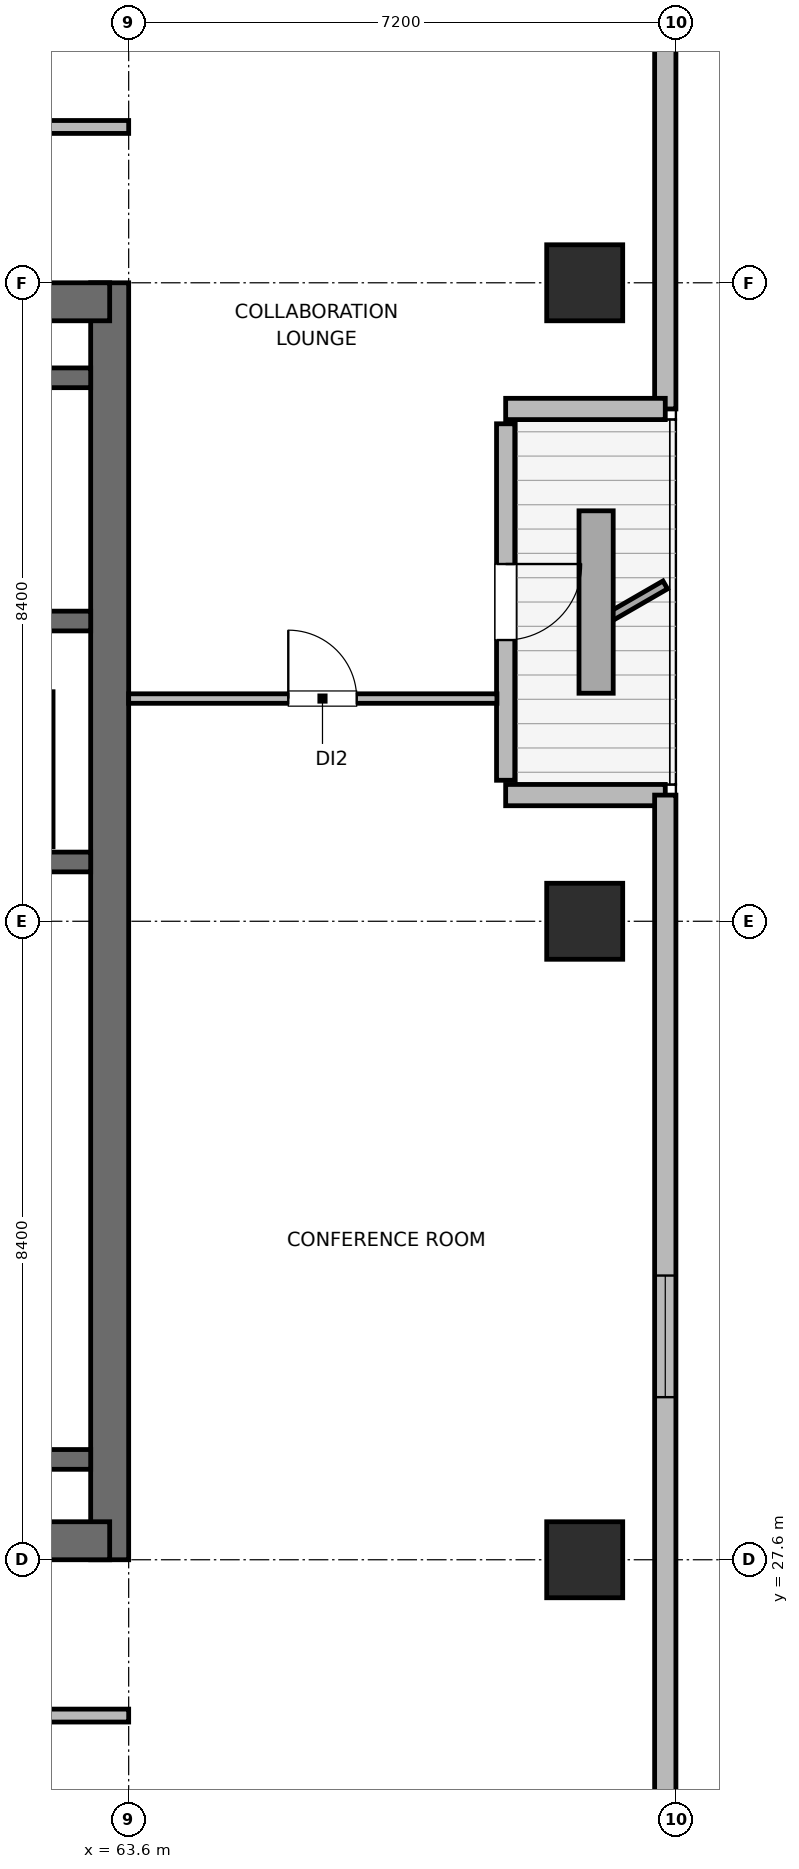
"""IFC4 building model, lengths in metres.
Left out: names, types, materials, properties, quantities, classifications, styles, units other than length and angle.
Written with IfcOpenShell. Run it as: python <this file> out.ifc"""

import sys

from ifc_helpers import new_model, si_unit, direction, frame, frame_2d, origin, origin_2d, place, context, subcontext, project, spatial, rectangle, extrude, element, fill, save


model = new_model("IFC4")
c1 = context("Model", 3, precision=1e-05, world=origin(), true_north=direction((0.0, 1.0)))
c2 = subcontext(c1, "Body", "Model", "MODEL_VIEW")
j1 = project(units=[si_unit("LENGTHUNIT", "METRE"), si_unit("PLANEANGLEUNIT", "RADIAN")], contexts=[c1])
p1 = place(None, origin())
s1 = spatial("IfcSite", under=j1, at=p1, CompositionType="ELEMENT")
p2 = place(p1, origin())
s2 = spatial("IfcBuilding", under=s1, at=p2, CompositionType="ELEMENT")
p3 = place(p2, frame((0.0, 0.0, 278.4)))
s3 = spatial("IfcBuildingStorey", under=s2, at=p3, CompositionType="ELEMENT", Elevation=278.4)
p4 = place(p3, frame((63.35, 27.6, 0.0), z_axis=(0.0, 0.0, 1.0), x_axis=(0.0, 1.0, 0.0)))
e1 = element("IfcWall", 1, at=p4, inside=s3, PredefinedType="SHEAR", context=c2, shape_type="SweptSolid", body=[
    extrude(rectangle(XDim=16.8, YDim=0.5, at=frame_2d((8.4, 0.0))), origin(), (0.0, 0.0, 1.0), 3.9),
])
p5 = place(p3, frame((53.85, 27.85, 0.0), z_axis=(0.0, 0.0, 1.0), x_axis=(1.0, 0.0, 0.0)))
e2 = element("IfcWall", 2, at=p5, inside=s3, PredefinedType="SHEAR", context=c2, shape_type="SweptSolid", body=[
    extrude(rectangle(XDim=9.5, YDim=0.5, at=frame_2d((4.75, 0.0))), origin(), (0.0, 0.0, 1.0), 3.9),
])
p6 = place(p5, frame((4.025, 0.0, 0.0)))
e3 = element("IfcOpeningElement", 3, at=p6, cuts=e2, PredefinedType="OPENING", context=c2, shape_type="SweptSolid", body=[
    extrude(rectangle(XDim=1.05, YDim=2.04, at=frame_2d((0.525, 1.02))), frame((0.0, 0.26, 0.0), z_axis=(0.0, -1.0, 0.0), x_axis=(1.0, 0.0, 0.0)), (0.0, 0.0, 1.0), 0.52),
])
p7 = place(p3, frame((53.85, 44.15, 0.0), z_axis=(0.0, 0.0, 1.0), x_axis=(1.0, 0.0, 0.0)))
e4 = element("IfcWall", 4, at=p7, inside=s3, PredefinedType="SHEAR", context=c2, shape_type="SweptSolid", body=[
    extrude(rectangle(XDim=9.5, YDim=0.5, at=frame_2d((4.75, 0.0))), origin(), (0.0, 0.0, 1.0), 3.9),
])
for number, where, z_axis, x_axis in (
    (5, (58.89, 28.92, 0.0), (0.0, 0.0, 1.0), (1.0, 0.0, 0.0)),
    (6, (58.89, 36.78, 0.0), (0.0, 0.0, 1.0), (1.0, 0.0, 0.0)),
):
    element("IfcWall", number, at=place(p3, frame(where, z_axis=z_axis, x_axis=x_axis)), inside=s3, PredefinedType="SHEAR", context=c2, shape_type="SweptSolid", body=[
        extrude(rectangle(XDim=4.21, YDim=0.26, at=frame_2d((2.105, 0.0))), origin(), (0.0, 0.0, 1.0), 3.9),
    ])
p8 = place(p3, frame((54.1, 39.95, 0.0), z_axis=(0.0, 0.0, 1.0), x_axis=(1.0, 0.0, 0.0)))
e7 = element("IfcWall", 7, at=p8, inside=s3, PredefinedType="SHEAR", context=c2, shape_type="SweptSolid", body=[
    extrude(rectangle(XDim=9.0, YDim=0.26, at=frame_2d((4.5, 0.0))), origin(), (0.0, 0.0, 1.0), 3.9),
])
p9 = place(p8, frame((1.1, 0.0, 0.0)))
e8 = element("IfcOpeningElement", 8, at=p9, cuts=e7, PredefinedType="OPENING", context=c2, shape_type="SweptSolid", body=[
    extrude(rectangle(XDim=1.0, YDim=2.04, at=frame_2d((0.5, 1.02))), frame((0.0, 0.14, 0.0), z_axis=(0.0, -1.0, 0.0), x_axis=(1.0, 0.0, 0.0)), (0.0, 0.0, 1.0), 0.28),
])
p10 = place(p3, frame((54.1, 43.15, 0.0), z_axis=(0.0, 0.0, 1.0), x_axis=(1.0, 0.0, 0.0)))
e9 = element("IfcWall", 9, at=p10, inside=s3, PredefinedType="SHEAR", context=c2, shape_type="SweptSolid", body=[
    extrude(rectangle(XDim=9.0, YDim=0.26, at=frame_2d((4.5, 0.0))), origin(), (0.0, 0.0, 1.0), 3.9),
])
for number, where, z_axis, x_axis in (
    (10, (69.6, 27.6, 0.0), (0.0, 0.0, 1.0), (1.0, 0.0, 0.0)),
    (11, (69.6, 36.0, 0.0), (0.0, 0.0, 1.0), (1.0, 0.0, 0.0)),
    (12, (69.6, 44.4, 0.0), (0.0, 0.0, 1.0), (1.0, 0.0, 0.0)),
):
    element("IfcColumn", number, at=place(p3, frame(where, z_axis=z_axis, x_axis=x_axis)), inside=s3, PredefinedType="COLUMN", context=c2, shape_type="SweptSolid", body=[
        extrude(rectangle(XDim=1.0, YDim=1.0, at=origin_2d()), origin(), (0.0, 0.0, 1.0), 3.9),
    ])
p11 = place(p3, frame((70.66, 48.582, 0.0), z_axis=(0.0, 0.0, 1.0), x_axis=(0.0, -1.0, 0.0)))
e13 = element("IfcWall", 13, at=p11, inside=s3, PredefinedType="SOLIDWALL", context=c2, shape_type="SweptSolid", body=[
    extrude(rectangle(XDim=5.842, YDim=0.28, at=frame_2d((2.921, 0.0))), origin(), (0.0, 0.0, 1.0), 3.6),
])
p12 = place(p3, frame((70.66, 42.74, 0.0), z_axis=(0.0, 0.0, 1.0), x_axis=(-1.0, 0.0, 0.0)))
e14 = element("IfcWall", 14, at=p12, inside=s3, PredefinedType="SOLIDWALL", context=c2, shape_type="SweptSolid", body=[
    extrude(rectangle(XDim=2.1, YDim=0.28, at=frame_2d((1.05, 0.0))), origin(), (0.0, 0.0, 1.0), 3.046),
])
p13 = place(p3, frame((68.56, 42.545, 0.0), z_axis=(0.0, 0.0, 1.0), x_axis=(0.0, -1.0, 0.0)))
e15 = element("IfcWall", 15, at=p13, inside=s3, PredefinedType="SOLIDWALL", context=c2, shape_type="SweptSolid", body=[
    extrude(rectangle(XDim=4.69, YDim=0.24, at=frame_2d((2.345, 0.0))), origin(), (0.0, 0.0, 1.0), 3.231),
])
p14 = place(p13, frame((1.845, 0.0, 0.0)))
e16 = element("IfcOpeningElement", 16, at=p14, cuts=e15, PredefinedType="OPENING", context=c2, shape_type="SweptSolid", body=[
    extrude(rectangle(XDim=1.0, YDim=2.02, at=frame_2d((0.5, 1.01))), frame((0.0, 0.13, 0.0), z_axis=(0.0, -1.0, 0.0), x_axis=(1.0, 0.0, 0.0)), (0.0, 0.0, 1.0), 0.26),
])
p15 = place(p3, frame((68.56, 37.66, 0.0), z_axis=(0.0, 0.0, 1.0), x_axis=(1.0, 0.0, 0.0)))
e17 = element("IfcWall", 17, at=p15, inside=s3, PredefinedType="SOLIDWALL", context=c2, shape_type="SweptSolid", body=[
    extrude(rectangle(XDim=2.1, YDim=0.28, at=frame_2d((1.05, 0.0))), origin(), (0.0, 0.0, 1.0), 3.046),
])
p16 = place(p3, frame((70.66, 37.66, 0.0), z_axis=(0.0, 0.0, 1.0), x_axis=(0.0, -1.0, 0.0)))
e18 = element("IfcWall", 18, at=p16, inside=s3, PredefinedType="SOLIDWALL", context=c2, shape_type="SweptSolid", body=[
    extrude(rectangle(XDim=14.241, YDim=0.28, at=frame_2d((7.121, 0.0))), origin(), (0.0, 0.0, 1.0), 3.6),
])
p17 = place(p16, frame((6.321, 0.0, 0.85)))
e19 = element("IfcOpeningElement", 19, at=p17, cuts=e18, PredefinedType="OPENING", context=c2, shape_type="SweptSolid", body=[
    extrude(rectangle(XDim=1.6, YDim=1.0, at=frame_2d((0.8, 0.5))), frame((0.0, 0.15, 0.0), z_axis=(0.0, -1.0, 0.0), x_axis=(1.0, 0.0, 0.0)), (0.0, 0.0, 1.0), 0.3),
])
p18 = place(p3, frame((62.5, 36.98, 0.0), z_axis=(0.0, 0.0, 1.0), x_axis=(0.0, 1.0, 0.0)))
e20 = element("IfcWall", 20, at=p18, inside=s3, PredefinedType="PARTITIONING", context=c2, shape_type="SweptSolid", body=[
    extrude(rectangle(XDim=2.04, YDim=0.21, at=frame_2d((1.02, 0.0))), origin(), (0.0, 0.0, 1.0), 3.6),
])
p19 = place(p3, frame((30.35, 25.55, 0.0), z_axis=(0.0, 0.0, 1.0), x_axis=(1.0, 0.0, 0.0)))
e21 = element("IfcWall", 21, at=p19, inside=s3, PredefinedType="PARTITIONING", context=c2, shape_type="SweptSolid", body=[
    extrude(rectangle(XDim=33.25, YDim=0.17, at=frame_2d((16.625, 0.0))), origin(), (0.0, 0.0, 1.0), 3.6),
])
p20 = place(p19, frame((5.95, 0.0, 0.0)))
e22 = element("IfcOpeningElement", 22, at=p20, cuts=e21, PredefinedType="OPENING", context=c2, shape_type="SweptSolid", body=[
    extrude(rectangle(XDim=0.95, YDim=2.04, at=frame_2d((0.475, 1.02))), frame((0.0, 0.095, 0.0), z_axis=(0.0, -1.0, 0.0), x_axis=(1.0, 0.0, 0.0)), (0.0, 0.0, 1.0), 0.19),
])
p21 = place(p19, frame((22.575, 0.0, 0.0)))
e23 = element("IfcOpeningElement", 23, at=p21, cuts=e21, PredefinedType="OPENING", context=c2, shape_type="SweptSolid", body=[
    extrude(rectangle(XDim=0.95, YDim=2.04, at=frame_2d((0.475, 1.02))), frame((0.0, 0.095, 0.0), z_axis=(0.0, -1.0, 0.0), x_axis=(1.0, 0.0, 0.0)), (0.0, 0.0, 1.0), 0.19),
])
p22 = place(p3, frame((30.35, 46.45, 0.0), z_axis=(0.0, 0.0, 1.0), x_axis=(1.0, 0.0, 0.0)))
e24 = element("IfcWall", 24, at=p22, inside=s3, PredefinedType="PARTITIONING", context=c2, shape_type="SweptSolid", body=[
    extrude(rectangle(XDim=33.25, YDim=0.17, at=frame_2d((16.625, 0.0))), origin(), (0.0, 0.0, 1.0), 3.6),
])
p23 = place(p22, frame((2.35, 0.0, 0.0)))
e25 = element("IfcOpeningElement", 25, at=p23, cuts=e24, PredefinedType="OPENING", context=c2, shape_type="SweptSolid", body=[
    extrude(rectangle(XDim=0.95, YDim=2.04, at=frame_2d((0.475, 1.02))), frame((0.0, 0.095, 0.0), z_axis=(0.0, -1.0, 0.0), x_axis=(1.0, 0.0, 0.0)), (0.0, 0.0, 1.0), 0.19),
])
p24 = place(p22, frame((7.275, 0.0, 0.0)))
e26 = element("IfcOpeningElement", 26, at=p24, cuts=e24, PredefinedType="OPENING", context=c2, shape_type="SweptSolid", body=[
    extrude(rectangle(XDim=0.95, YDim=2.04, at=frame_2d((0.475, 1.02))), frame((0.0, 0.095, 0.0), z_axis=(0.0, -1.0, 0.0), x_axis=(1.0, 0.0, 0.0)), (0.0, 0.0, 1.0), 0.19),
])
p25 = place(p22, frame((12.475, 0.0, 0.0)))
e27 = element("IfcOpeningElement", 27, at=p25, cuts=e24, PredefinedType="OPENING", context=c2, shape_type="SweptSolid", body=[
    extrude(rectangle(XDim=0.95, YDim=2.04, at=frame_2d((0.475, 1.02))), frame((0.0, 0.095, 0.0), z_axis=(0.0, -1.0, 0.0), x_axis=(1.0, 0.0, 0.0)), (0.0, 0.0, 1.0), 0.19),
])
p26 = place(p22, frame((18.175, 0.0, 0.0)))
e28 = element("IfcOpeningElement", 28, at=p26, cuts=e24, PredefinedType="OPENING", context=c2, shape_type="SweptSolid", body=[
    extrude(rectangle(XDim=0.95, YDim=2.04, at=frame_2d((0.475, 1.02))), frame((0.0, 0.095, 0.0), z_axis=(0.0, -1.0, 0.0), x_axis=(1.0, 0.0, 0.0)), (0.0, 0.0, 1.0), 0.19),
])
p27 = place(p22, frame((23.175, 0.0, 0.0)))
e29 = element("IfcOpeningElement", 29, at=p27, cuts=e24, PredefinedType="OPENING", context=c2, shape_type="SweptSolid", body=[
    extrude(rectangle(XDim=0.95, YDim=2.04, at=frame_2d((0.475, 1.02))), frame((0.0, 0.095, 0.0), z_axis=(0.0, -1.0, 0.0), x_axis=(1.0, 0.0, 0.0)), (0.0, 0.0, 1.0), 0.19),
])
p28 = place(p22, frame((27.675, 0.0, 0.0)))
e30 = element("IfcOpeningElement", 30, at=p28, cuts=e24, PredefinedType="OPENING", context=c2, shape_type="SweptSolid", body=[
    extrude(rectangle(XDim=0.95, YDim=2.04, at=frame_2d((0.475, 1.02))), frame((0.0, 0.095, 0.0), z_axis=(0.0, -1.0, 0.0), x_axis=(1.0, 0.0, 0.0)), (0.0, 0.0, 1.0), 0.19),
])
p29 = place(p22, frame((31.275, 0.0, 0.0)))
e31 = element("IfcOpeningElement", 31, at=p29, cuts=e24, PredefinedType="OPENING", context=c2, shape_type="SweptSolid", body=[
    extrude(rectangle(XDim=0.95, YDim=2.04, at=frame_2d((0.475, 1.02))), frame((0.0, 0.095, 0.0), z_axis=(0.0, -1.0, 0.0), x_axis=(1.0, 0.0, 0.0)), (0.0, 0.0, 1.0), 0.19),
])
p30 = place(p3, frame((63.6, 38.93, 0.0), z_axis=(0.0, 0.0, 1.0), x_axis=(1.0, 0.0, 0.0)))
e32 = element("IfcWall", 32, at=p30, inside=s3, PredefinedType="PARTITIONING", context=c2, shape_type="SweptSolid", body=[
    extrude(rectangle(XDim=4.845, YDim=0.125, at=frame_2d((2.422, 0.0))), origin(), (0.0, 0.0, 1.0), 3.6),
])
p31 = place(p30, frame((2.1, 0.0, 0.0)))
e33 = element("IfcOpeningElement", 33, at=p31, cuts=e32, PredefinedType="OPENING", context=c2, shape_type="SweptSolid", body=[
    extrude(rectangle(XDim=0.9, YDim=2.02, at=frame_2d((0.45, 1.01))), frame((0.0, 0.073, 0.0), z_axis=(0.0, -1.0, 0.0), x_axis=(1.0, 0.0, 0.0)), (0.0, 0.0, 1.0), 0.145),
])
p32 = place(p14, origin())
e34 = element("IfcDoor", 34, at=p32, inside=s3, OperationType="SINGLE_SWING_LEFT", PredefinedType="DOOR", context=c2, shape_type="SweptSolid", body=[
    extrude(rectangle(XDim=1.0, YDim=2.02, at=frame_2d((0.5, 1.01))), frame((0.0, 0.025, 0.0), z_axis=(0.0, -1.0, 0.0), x_axis=(1.0, 0.0, 0.0)), (0.0, 0.0, 1.0), 0.05),
])
fill(e16, e34)
p33 = place(p17, origin())
e35 = element("IfcWindow", 35, at=p33, inside=s3, PartitioningType="SINGLE_PANEL", PredefinedType="WINDOW", context=c2, shape_type="SweptSolid", body=[
    extrude(rectangle(XDim=1.6, YDim=1.0, at=frame_2d((0.8, 0.5))), frame((0.0, 0.03, 0.0), z_axis=(0.0, -1.0, 0.0), x_axis=(1.0, 0.0, 0.0)), (0.0, 0.0, 1.0), 0.06),
])
fill(e19, e35)
p34 = place(p31, origin())
e36 = element("IfcDoor", 36, at=p34, inside=s3, OperationType="SINGLE_SWING_LEFT", PredefinedType="DOOR", context=c2, shape_type="SweptSolid", body=[
    extrude(rectangle(XDim=0.9, YDim=2.02, at=frame_2d((0.45, 1.01))), frame((0.0, 0.025, 0.0), z_axis=(0.0, -1.0, 0.0), x_axis=(1.0, 0.0, 0.0)), (0.0, 0.0, 1.0), 0.05),
])
fill(e33, e36)
save(model, sys.argv[1])
